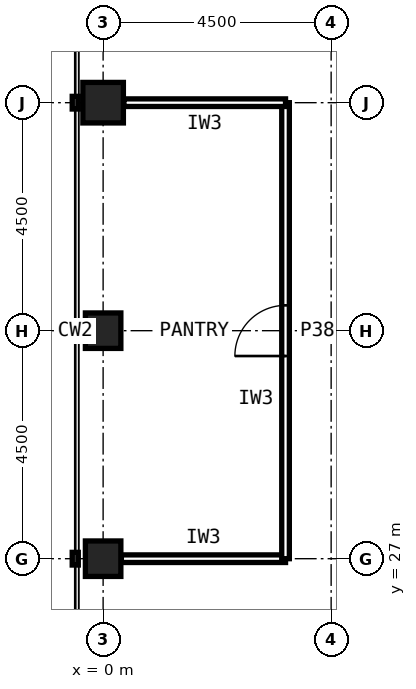
"""IFC4 building model, lengths in metres.
Left out: names, types, materials, properties, quantities, classifications, styles, units other than length and angle.
Written with IfcOpenShell. Run it as: python <this file> out.ifc"""

import sys

from ifc_helpers import new_model, si_unit, direction, frame, frame_2d, origin, origin_2d, place, context, subcontext, project, spatial, rectangle, hollow_rectangle, extrude, element, fill, save


model = new_model("IFC4")
c1 = context("Model", 3, precision=1e-05, world=origin(), true_north=direction((0.0, 1.0)))
c2 = subcontext(c1, "Body", "Model", "MODEL_VIEW")
j1 = project(units=[si_unit("LENGTHUNIT", "METRE"), si_unit("PLANEANGLEUNIT", "RADIAN")], contexts=[c1])
p1 = place(None, origin())
s1 = spatial("IfcSite", under=j1, at=p1, CompositionType="ELEMENT")
p2 = place(p1, origin())
s2 = spatial("IfcBuilding", under=s1, at=p2, CompositionType="ELEMENT")
p3 = place(p2, frame((0.0, 0.0, 159.6)))
s3 = spatial("IfcBuildingStorey", under=s2, at=p3, CompositionType="ELEMENT", Elevation=159.6)
p4 = place(p3, frame((0.0, 36.0, 0.0), z_axis=(0.0, 0.0, 1.0), x_axis=(1.0, 0.0, 0.0)))
e1 = element("IfcColumn", 1, at=p4, inside=s3, PredefinedType="COLUMN", context=c2, shape_type="SweptSolid", body=[
    extrude(hollow_rectangle(XDim=0.8, YDim=0.8, WallThickness=0.045, at=origin_2d()), origin(), (0.0, 0.0, 1.0), 4.0),
])
for number, where, z_axis, x_axis in (
    (2, (0.0, 31.5, 0.0), (0.0, 0.0, 1.0), (1.0, 0.0, 0.0)),
    (3, (0.0, 27.0, 0.0), (0.0, 0.0, 1.0), (1.0, 0.0, 0.0)),
):
    element("IfcColumn", number, at=place(p3, frame(where, z_axis=z_axis, x_axis=x_axis)), inside=s3, PredefinedType="COLUMN", context=c2, shape_type="SweptSolid", body=[
        extrude(hollow_rectangle(XDim=0.7, YDim=0.7, WallThickness=0.036, at=origin_2d()), origin(), (0.0, 0.0, 1.0), 4.0),
    ])
p5 = place(p3, frame((0.36, 27.0, 0.0), z_axis=(0.0, 0.0, 1.0), x_axis=(1.0, 0.0, 0.0)))
e4 = element("IfcWall", 4, at=p5, inside=s3, PredefinedType="PARTITIONING", context=c2, shape_type="SweptSolid", body=[
    extrude(rectangle(XDim=3.24, YDim=0.15, at=frame_2d((1.62, 0.0))), origin(), (0.0, 0.0, 1.0), 2.989),
])
p6 = place(p3, frame((3.6, 27.0, 0.0), z_axis=(0.0, 0.0, 1.0), x_axis=(0.0, 1.0, 0.0)))
e5 = element("IfcWall", 5, at=p6, inside=s3, PredefinedType="PARTITIONING", context=c2, shape_type="SweptSolid", body=[
    extrude(rectangle(XDim=9.0, YDim=0.15, at=frame_2d((4.5, 0.0))), origin(), (0.0, 0.0, 1.0), 3.84),
])
p7 = place(p6, frame((4.0, 0.0, 0.0)))
e6 = element("IfcOpeningElement", 6, at=p7, cuts=e5, PredefinedType="OPENING", context=c2, shape_type="SweptSolid", body=[
    extrude(rectangle(XDim=1.0, YDim=2.1, at=frame_2d((0.5, 1.05))), frame((0.0, 0.085, 0.0), z_axis=(0.0, -1.0, 0.0), x_axis=(1.0, 0.0, 0.0)), (0.0, 0.0, 1.0), 0.17),
])
p8 = place(p3, frame((3.6, 36.0, 0.0), z_axis=(0.0, 0.0, 1.0), x_axis=(-1.0, 0.0, 0.0)))
e7 = element("IfcWall", 7, at=p8, inside=s3, PredefinedType="PARTITIONING", context=c2, shape_type="SweptSolid", body=[
    extrude(rectangle(XDim=3.19, YDim=0.15, at=frame_2d((1.595, 0.0))), origin(), (0.0, 0.0, 1.0), 2.989),
])
p9 = place(p7, origin())
e8 = element("IfcDoor", 8, at=p9, inside=s3, OperationType="SINGLE_SWING_LEFT", PredefinedType="DOOR", context=c2, shape_type="SweptSolid", body=[
    extrude(rectangle(XDim=1.0, YDim=2.1, at=frame_2d((0.5, 1.05))), frame((0.0, 0.025, 0.0), z_axis=(0.0, -1.0, 0.0), x_axis=(1.0, 0.0, 0.0)), (0.0, 0.0, 1.0), 0.05),
])
fill(e6, e8)
save(model, sys.argv[1])
